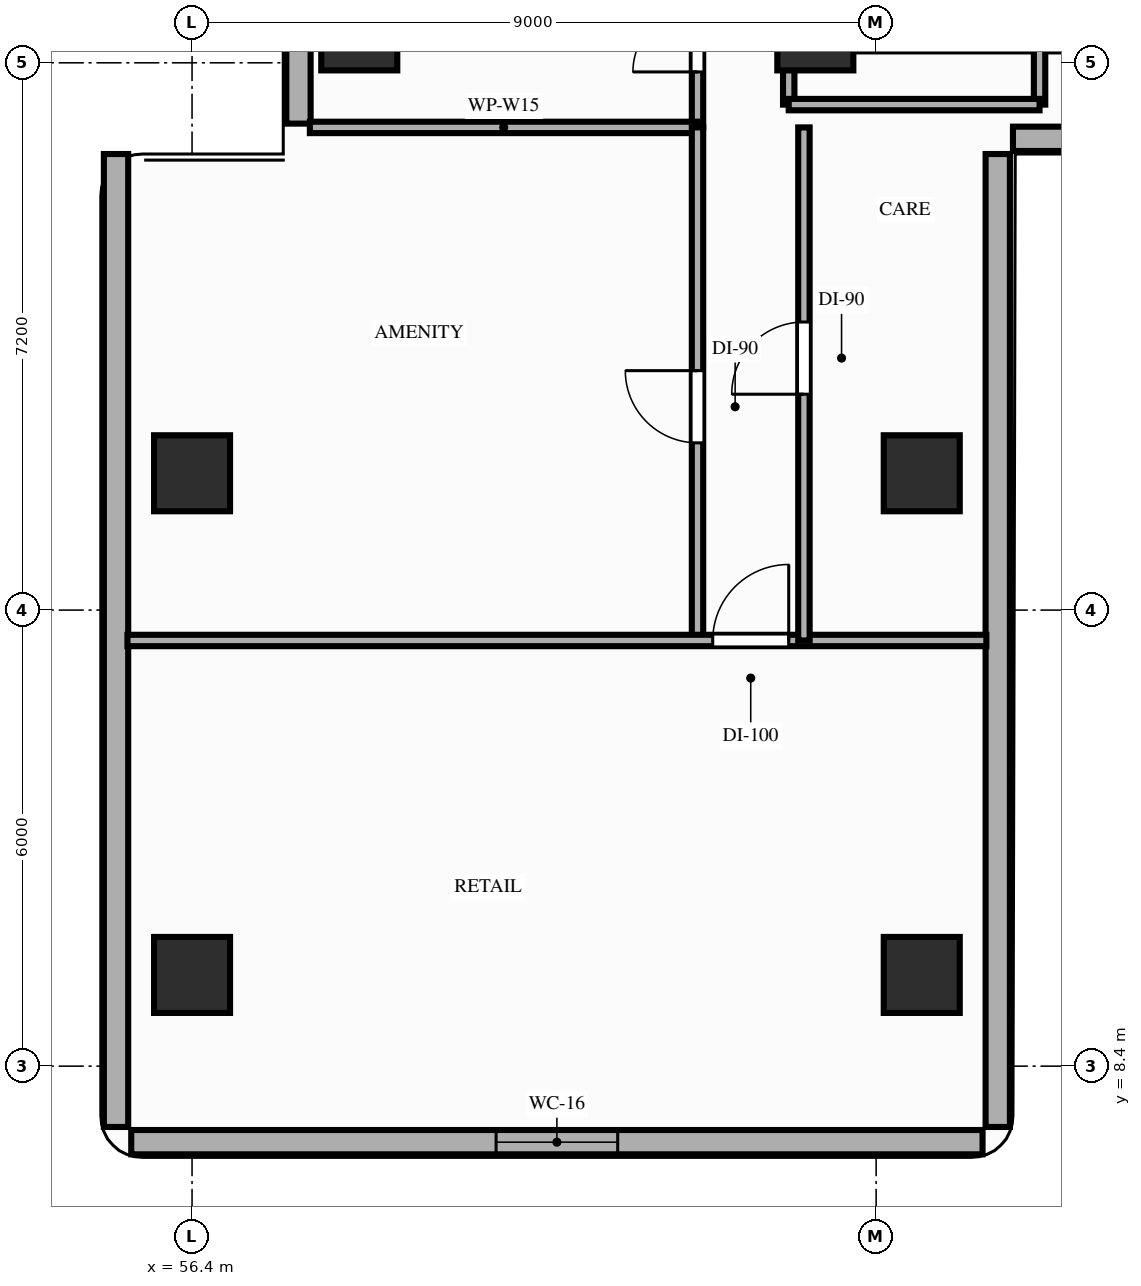
"""IFC4 building model, lengths in metres.
Left out: names, types, materials, properties, quantities, classifications, styles, units other than length and angle.
Written with IfcOpenShell. Run it as: python <this file> out.ifc"""

import sys

from ifc_helpers import new_model, si_unit, direction, frame, frame_2d, origin, origin_2d, place, context, subcontext, project, spatial, rectangle, extrude, element, fill, save


model = new_model("IFC4")
c1 = context("Model", 3, precision=1e-05, world=origin(), true_north=direction((0.0, 1.0)))
c2 = subcontext(c1, "Body", "Model", "MODEL_VIEW")
j1 = project(units=[si_unit("LENGTHUNIT", "METRE"), si_unit("PLANEANGLEUNIT", "RADIAN")], contexts=[c1])
p1 = place(None, origin())
s1 = spatial("IfcSite", under=j1, at=p1, CompositionType="ELEMENT")
p2 = place(p1, origin())
s2 = spatial("IfcBuilding", under=s1, at=p2, CompositionType="ELEMENT")
p3 = place(p2, frame((0.0, 0.0, 53.2)))
s3 = spatial("IfcBuildingStorey", under=s2, at=p3, CompositionType="ELEMENT", Elevation=53.2)
for number, where, z_axis, x_axis in (
    (1, (64.6, 22.0, 0.0), (0.0, 0.0, 1.0), (1.0, 0.0, 0.0)),
    (2, (58.6, 22.0, 0.0), (0.0, 0.0, 1.0), (1.0, 0.0, 0.0)),
    (3, (56.4, 9.6, 0.0), (0.0, 0.0, 1.0), (1.0, 0.0, 0.0)),
    (4, (56.4, 16.2, 0.0), (0.0, 0.0, 1.0), (1.0, 0.0, 0.0)),
    (5, (66.0, 9.6, 0.0), (0.0, 0.0, 1.0), (1.0, 0.0, 0.0)),
    (6, (66.0, 16.2, 0.0), (0.0, 0.0, 1.0), (1.0, 0.0, 0.0)),
):
    element("IfcColumn", number, at=place(p3, frame(where, z_axis=z_axis, x_axis=x_axis)), inside=s3, PredefinedType="COLUMN", context=c2, shape_type="SweptSolid", body=[
        extrude(rectangle(XDim=1.0, YDim=1.0, at=origin_2d()), origin(), (0.0, 0.0, 1.0), 3.2),
    ])
p4 = place(p3, frame((57.8, 43.4, 0.0), z_axis=(0.0, 0.0, 1.0), x_axis=(0.0, -1.0, 0.0)))
e7 = element("IfcWall", 7, at=p4, inside=s3, PredefinedType="STANDARD", context=c2, shape_type="SweptSolid", body=[
    extrude(rectangle(XDim=22.6, YDim=0.32, at=frame_2d((11.3, 0.0))), origin(), (0.0, 0.0, 1.0), 2.5),
])
p5 = place(p3, frame((55.6, 7.4, 0.0), z_axis=(0.0, 0.0, 1.0), x_axis=(1.0, 0.0, 0.0)))
e8 = element("IfcWall", 8, at=p5, inside=s3, PredefinedType="STANDARD", context=c2, shape_type="SweptSolid", body=[
    extrude(rectangle(XDim=11.2, YDim=0.32, at=frame_2d((5.6, 0.0))), origin(), (0.0, 0.0, 1.0), 3.02),
])
p6 = place(p5, frame((4.8, 0.0, 0.85)))
e9 = element("IfcOpeningElement", 9, at=p6, cuts=e8, PredefinedType="OPENING", context=c2, shape_type="SweptSolid", body=[
    extrude(rectangle(XDim=1.6, YDim=1.7, at=frame_2d((0.8, 0.85))), frame((0.0, 0.17, 0.0), z_axis=(0.0, -1.0, 0.0), x_axis=(1.0, 0.0, 0.0)), (0.0, 0.0, 1.0), 0.34),
])
for number, where, z_axis, x_axis in (
    (10, (55.4, 20.4, 0.0), (0.0, 0.0, 1.0), (0.0, -1.0, 0.0)),
    (11, (67.0, 7.6, 0.0), (0.0, 0.0, 1.0), (0.0, 1.0, 0.0)),
):
    element("IfcWall", number, at=place(p3, frame(where, z_axis=z_axis, x_axis=x_axis)), inside=s3, PredefinedType="STANDARD", context=c2, shape_type="SweptSolid", body=[
        extrude(rectangle(XDim=12.8, YDim=0.32, at=frame_2d((6.4, 0.0))), origin(), (0.0, 0.0, 1.0), 3.02),
    ])
p7 = place(p3, frame((67.2, 20.6, 0.0), z_axis=(0.0, 0.0, 1.0), x_axis=(1.0, 0.0, 0.0)))
e12 = element("IfcWall", 12, at=p7, inside=s3, PredefinedType="STANDARD", context=c2, shape_type="SweptSolid", body=[
    extrude(rectangle(XDim=5.6, YDim=0.32, at=frame_2d((2.8, 0.0))), origin(), (0.0, 0.0, 1.0), 3.02),
])
p8 = place(p3, frame((64.25, 21.05, 0.0), z_axis=(0.0, 0.0, 1.0), x_axis=(0.0, 1.0, 0.0)))
e13 = element("IfcWall", 13, at=p8, inside=s3, PredefinedType="PARTITIONING", context=c2, shape_type="SweptSolid", body=[
    extrude(rectangle(XDim=6.55, YDim=0.15, at=frame_2d((3.275, 0.0))), origin(), (0.0, 0.0, 1.0), 2.5),
])
p9 = place(p8, frame((3.1, 0.0, 0.0)))
e14 = element("IfcOpeningElement", 14, at=p9, cuts=e13, PredefinedType="OPENING", context=c2, shape_type="SweptSolid", body=[
    extrude(rectangle(XDim=0.95, YDim=2.15, at=frame_2d((0.475, 1.075))), frame((0.0, 0.085, 0.0), z_axis=(0.0, -1.0, 0.0), x_axis=(1.0, 0.0, 0.0)), (0.0, 0.0, 1.0), 0.17),
])
p10 = place(p3, frame((67.55, 21.05, 0.0), z_axis=(0.0, 0.0, 1.0), x_axis=(0.0, 1.0, 0.0)))
e15 = element("IfcWall", 15, at=p10, inside=s3, PredefinedType="PARTITIONING", context=c2, shape_type="SweptSolid", body=[
    extrude(rectangle(XDim=6.47, YDim=0.15, at=frame_2d((3.235, 0.0))), origin(), (0.0, 0.0, 1.0), 2.5),
])
p11 = place(p3, frame((64.25, 21.05, 0.0), z_axis=(0.0, 0.0, 1.0), x_axis=(1.0, 0.0, 0.0)))
e16 = element("IfcWall", 16, at=p11, inside=s3, PredefinedType="PARTITIONING", context=c2, shape_type="SweptSolid", body=[
    extrude(rectangle(XDim=3.3, YDim=0.15, at=frame_2d((1.65, 0.0))), origin(), (0.0, 0.0, 1.0), 2.5),
])
p12 = place(p3, frame((63.05, 20.75, 0.0), z_axis=(0.0, 0.0, 1.0), x_axis=(0.0, 1.0, 0.0)))
e17 = element("IfcWall", 17, at=p12, inside=s3, PredefinedType="PARTITIONING", context=c2, shape_type="SweptSolid", body=[
    extrude(rectangle(XDim=22.7, YDim=0.15, at=frame_2d((11.35, 0.0))), origin(), (0.0, 0.0, 1.0), 2.5),
])
p13 = place(p12, frame((0.73, 0.0, 0.0)))
e18 = element("IfcOpeningElement", 18, at=p13, cuts=e17, PredefinedType="OPENING", context=c2, shape_type="SweptSolid", body=[
    extrude(rectangle(XDim=0.85, YDim=2.1, at=frame_2d((0.425, 1.05))), frame((0.0, 0.085, 0.0), z_axis=(0.0, -1.0, 0.0), x_axis=(1.0, 0.0, 0.0)), (0.0, 0.0, 1.0), 0.17),
])
p14 = place(p12, frame((3.43, 0.0, 0.0)))
e19 = element("IfcOpeningElement", 19, at=p14, cuts=e17, PredefinedType="OPENING", context=c2, shape_type="SweptSolid", body=[
    extrude(rectangle(XDim=0.95, YDim=2.1, at=frame_2d((0.475, 1.05))), frame((0.0, 0.085, 0.0), z_axis=(0.0, -1.0, 0.0), x_axis=(1.0, 0.0, 0.0)), (0.0, 0.0, 1.0), 0.17),
])
p15 = place(p12, frame((8.15, 0.0, 0.0)))
e20 = element("IfcOpeningElement", 20, at=p15, cuts=e17, PredefinedType="OPENING", context=c2, shape_type="SweptSolid", body=[
    extrude(rectangle(XDim=0.95, YDim=2.15, at=frame_2d((0.475, 1.075))), frame((0.0, 0.085, 0.0), z_axis=(0.0, -1.0, 0.0), x_axis=(1.0, 0.0, 0.0)), (0.0, 0.0, 1.0), 0.17),
])
p16 = place(p12, frame((13.67, 0.0, 0.0)))
e21 = element("IfcOpeningElement", 21, at=p16, cuts=e17, PredefinedType="OPENING", context=c2, shape_type="SweptSolid", body=[
    extrude(rectangle(XDim=0.95, YDim=2.15, at=frame_2d((0.475, 1.075))), frame((0.0, 0.085, 0.0), z_axis=(0.0, -1.0, 0.0), x_axis=(1.0, 0.0, 0.0)), (0.0, 0.0, 1.0), 0.17),
])
p17 = place(p12, frame((19.47, 0.0, 0.0)))
e22 = element("IfcOpeningElement", 22, at=p17, cuts=e17, PredefinedType="OPENING", context=c2, shape_type="SweptSolid", body=[
    extrude(rectangle(XDim=0.95, YDim=2.15, at=frame_2d((0.475, 1.075))), frame((0.0, 0.085, 0.0), z_axis=(0.0, -1.0, 0.0), x_axis=(1.0, 0.0, 0.0)), (0.0, 0.0, 1.0), 0.17),
])
p18 = place(p3, frame((57.95, 20.75, 0.0), z_axis=(0.0, 0.0, 1.0), x_axis=(1.0, 0.0, 0.0)))
e23 = element("IfcWall", 23, at=p18, inside=s3, PredefinedType="PARTITIONING", context=c2, shape_type="SweptSolid", body=[
    extrude(rectangle(XDim=5.1, YDim=0.15, at=frame_2d((2.55, 0.0))), origin(), (0.0, 0.0, 1.0), 2.5),
])
p19 = place(p3, frame((63.05, 14.0, 0.0), z_axis=(0.0, 0.0, 1.0), x_axis=(0.0, 1.0, 0.0)))
e24 = element("IfcWall", 24, at=p19, inside=s3, PredefinedType="PARTITIONING", context=c2, shape_type="SweptSolid", body=[
    extrude(rectangle(XDim=6.75, YDim=0.15, at=frame_2d((3.375, 0.0))), origin(), (0.0, 0.0, 1.0), 2.5),
])
p20 = place(p19, frame((2.6, 0.0, 0.0)))
e25 = element("IfcOpeningElement", 25, at=p20, cuts=e24, PredefinedType="OPENING", context=c2, shape_type="SweptSolid", body=[
    extrude(rectangle(XDim=0.95, YDim=2.15, at=frame_2d((0.475, 1.075))), frame((0.0, 0.085, 0.0), z_axis=(0.0, -1.0, 0.0), x_axis=(1.0, 0.0, 0.0)), (0.0, 0.0, 1.0), 0.17),
])
p21 = place(p3, frame((55.55, 14.0, 0.0), z_axis=(0.0, 0.0, 1.0), x_axis=(1.0, 0.0, 0.0)))
e26 = element("IfcWall", 26, at=p21, inside=s3, PredefinedType="PARTITIONING", context=c2, shape_type="SweptSolid", body=[
    extrude(rectangle(XDim=11.3, YDim=0.15, at=frame_2d((5.65, 0.0))), origin(), (0.0, 0.0, 1.0), 2.5),
])
p22 = place(p21, frame((7.7, 0.0, 0.0)))
e27 = element("IfcOpeningElement", 27, at=p22, cuts=e26, PredefinedType="OPENING", context=c2, shape_type="SweptSolid", body=[
    extrude(rectangle(XDim=1.0, YDim=2.15, at=frame_2d((0.5, 1.075))), frame((0.0, 0.085, 0.0), z_axis=(0.0, -1.0, 0.0), x_axis=(1.0, 0.0, 0.0)), (0.0, 0.0, 1.0), 0.17),
])
p23 = place(p3, frame((64.45, 14.0, 0.0), z_axis=(0.0, 0.0, 1.0), x_axis=(0.0, 1.0, 0.0)))
e28 = element("IfcWall", 28, at=p23, inside=s3, PredefinedType="PARTITIONING", context=c2, shape_type="SweptSolid", body=[
    extrude(rectangle(XDim=6.75, YDim=0.15, at=frame_2d((3.375, 0.0))), origin(), (0.0, 0.0, 1.0), 2.5),
])
p24 = place(p23, frame((3.24, 0.0, 0.0)))
e29 = element("IfcOpeningElement", 29, at=p24, cuts=e28, PredefinedType="OPENING", context=c2, shape_type="SweptSolid", body=[
    extrude(rectangle(XDim=0.95, YDim=2.15, at=frame_2d((0.475, 1.075))), frame((0.0, 0.085, 0.0), z_axis=(0.0, -1.0, 0.0), x_axis=(1.0, 0.0, 0.0)), (0.0, 0.0, 1.0), 0.17),
])
p25 = place(p6, origin())
e30 = element("IfcWindow", 30, at=p25, inside=s3, PartitioningType="SINGLE_PANEL", PredefinedType="WINDOW", context=c2, shape_type="SweptSolid", body=[
    extrude(rectangle(XDim=1.6, YDim=1.7, at=frame_2d((0.8, 0.85))), frame((0.0, 0.03, 0.0), z_axis=(0.0, -1.0, 0.0), x_axis=(1.0, 0.0, 0.0)), (0.0, 0.0, 1.0), 0.06),
])
fill(e9, e30)
p26 = place(p13, origin())
e31 = element("IfcDoor", 31, at=p26, inside=s3, OperationType="SINGLE_SWING_LEFT", PredefinedType="DOOR", context=c2, shape_type="SweptSolid", body=[
    extrude(rectangle(XDim=0.85, YDim=2.1, at=frame_2d((0.425, 1.05))), frame((0.0, 0.025, 0.0), z_axis=(0.0, -1.0, 0.0), x_axis=(1.0, 0.0, 0.0)), (0.0, 0.0, 1.0), 0.05),
])
fill(e18, e31)
p27 = place(p20, origin())
e32 = element("IfcDoor", 32, at=p27, inside=s3, OperationType="SINGLE_SWING_RIGHT", PredefinedType="DOOR", context=c2, shape_type="SweptSolid", body=[
    extrude(rectangle(XDim=0.95, YDim=2.15, at=frame_2d((0.475, 1.075))), frame((0.0, 0.025, 0.0), z_axis=(0.0, -1.0, 0.0), x_axis=(1.0, 0.0, 0.0)), (0.0, 0.0, 1.0), 0.05),
])
fill(e25, e32)
p28 = place(p24, origin())
e33 = element("IfcDoor", 33, at=p28, inside=s3, OperationType="SINGLE_SWING_LEFT", PredefinedType="DOOR", context=c2, shape_type="SweptSolid", body=[
    extrude(rectangle(XDim=0.95, YDim=2.15, at=frame_2d((0.475, 1.075))), frame((0.0, 0.025, 0.0), z_axis=(0.0, -1.0, 0.0), x_axis=(1.0, 0.0, 0.0)), (0.0, 0.0, 1.0), 0.05),
])
fill(e29, e33)
p29 = place(p22, origin())
e34 = element("IfcDoor", 34, at=p29, inside=s3, OperationType="SINGLE_SWING_RIGHT", PredefinedType="DOOR", context=c2, shape_type="SweptSolid", body=[
    extrude(rectangle(XDim=1.0, YDim=2.15, at=frame_2d((0.5, 1.075))), frame((0.0, 0.025, 0.0), z_axis=(0.0, -1.0, 0.0), x_axis=(1.0, 0.0, 0.0)), (0.0, 0.0, 1.0), 0.05),
])
fill(e27, e34)
save(model, sys.argv[1])
